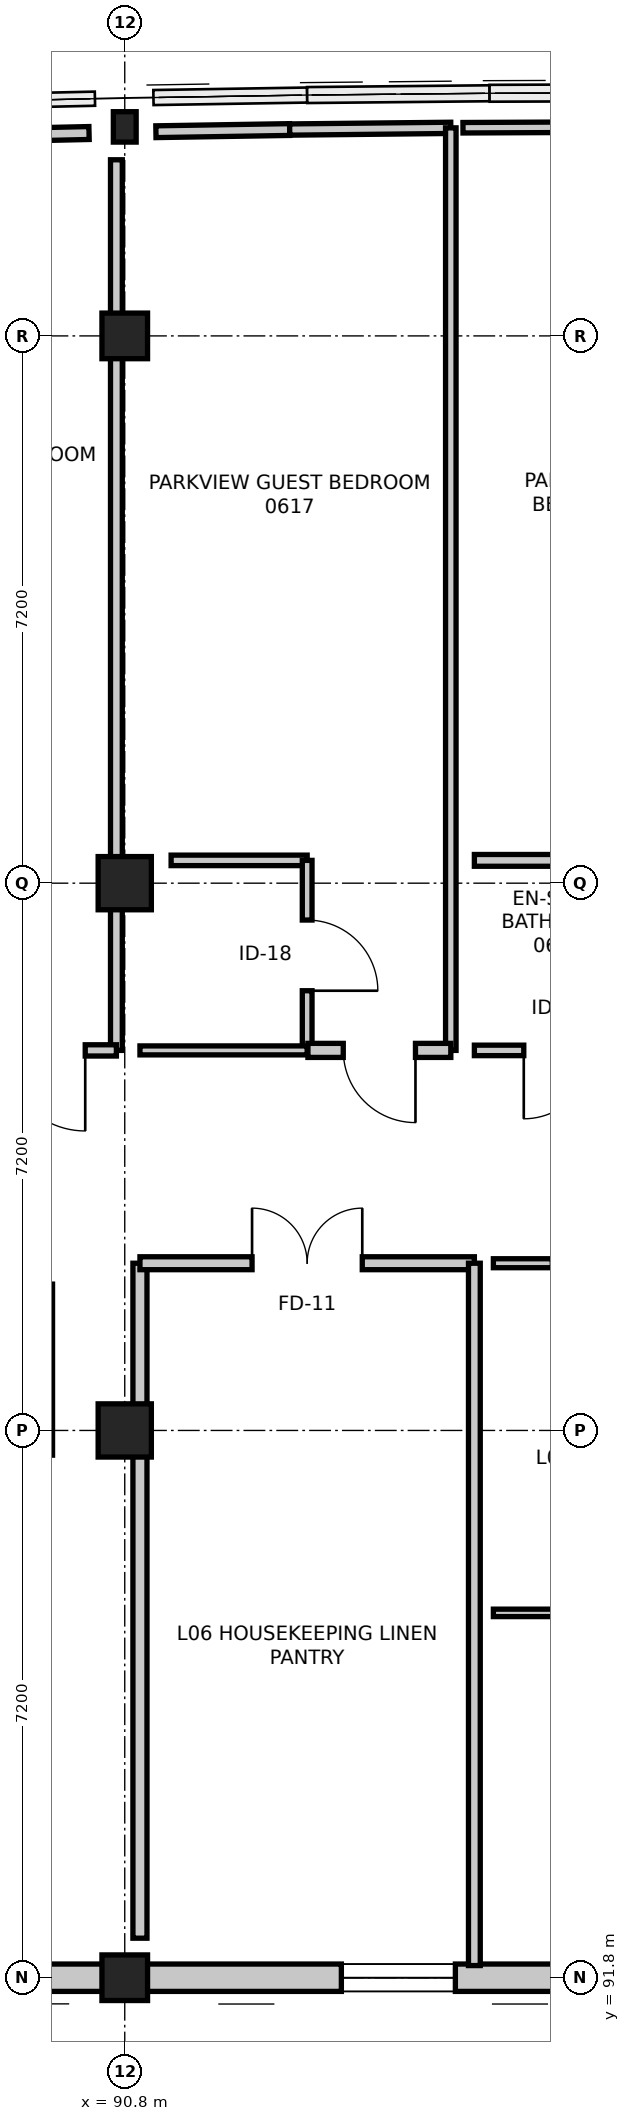
"""IFC4 building model, lengths in metres.
Left out: names, types, materials, properties, quantities, classifications, styles, units other than length and angle.
Written with IfcOpenShell. Run it as: python <this file> out.ifc"""

import sys

from ifc_helpers import new_model, si_unit, direction, frame, frame_2d, origin, origin_2d, place, context, subcontext, project, spatial, rectangle, i_section, extrude, element, fill, save


model = new_model("IFC4")
c1 = context("Model", 3, precision=1e-05, world=origin(), true_north=direction((0.0, 1.0)))
c2 = subcontext(c1, "Body", "Model", "MODEL_VIEW")
j1 = project(units=[si_unit("LENGTHUNIT", "METRE"), si_unit("PLANEANGLEUNIT", "RADIAN")], contexts=[c1])
p1 = place(None, origin())
s1 = spatial("IfcSite", under=j1, at=p1, CompositionType="ELEMENT")
p2 = place(p1, origin())
s2 = spatial("IfcBuilding", under=s1, at=p2, CompositionType="ELEMENT")
p3 = place(p2, frame((0.0, 0.0, 26.4)))
s3 = spatial("IfcBuildingStorey", under=s2, at=p3, CompositionType="ELEMENT", Elevation=26.4)
p4 = place(p3, frame((90.8, 91.8, 0.0), z_axis=(0.0, 0.0, 1.0), x_axis=(1.0, 0.0, 0.0)))
e1 = element("IfcColumn", 1, at=p4, inside=s3, PredefinedType="COLUMN", context=c2, shape_type="SweptSolid", body=[
    extrude(rectangle(XDim=0.6, YDim=0.6, at=origin_2d()), origin(), (0.0, 0.0, 1.0), 3.6),
])
for number, where, z_axis, x_axis in (
    (2, (90.8, 99.0, 0.0), (0.0, 0.0, 1.0), (1.0, 0.0, 0.0)),
    (3, (90.8, 106.2, 0.0), (0.0, 0.0, 1.0), (1.0, 0.0, 0.0)),
):
    element("IfcColumn", number, at=place(p3, frame(where, z_axis=z_axis, x_axis=x_axis)), inside=s3, PredefinedType="COLUMN", context=c2, shape_type="SweptSolid", body=[
        extrude(rectangle(XDim=0.7, YDim=0.7, at=origin_2d()), origin(), (0.0, 0.0, 1.0), 3.6),
    ])
p5 = place(p3, frame((90.8, 113.4, 0.0), z_axis=(0.0, 0.0, 1.0), x_axis=(1.0, 0.0, 0.0)))
e4 = element("IfcColumn", 4, at=p5, inside=s3, PredefinedType="COLUMN", context=c2, shape_type="SweptSolid", body=[
    extrude(rectangle(XDim=0.6, YDim=0.6, at=origin_2d()), origin(), (0.0, 0.0, 1.0), 3.6),
])
p6 = place(p3, frame((90.8, 116.15, 0.0), z_axis=(0.0, 0.0, 1.0), x_axis=(1.0, 0.0, 0.0)))
e5 = element("IfcColumn", 5, at=p6, inside=s3, PredefinedType="COLUMN", context=c2, shape_type="SweptSolid", body=[
    extrude(i_section(OverallWidth=0.3, OverallDepth=0.4, WebThickness=0.013, FlangeThickness=0.024, FilletRadius=0.027, at=origin_2d()), origin(), (0.0, 0.0, 1.0), 3.6),
])
p7 = place(p3, frame((98.0, 91.8, 0.0), z_axis=(0.0, 0.0, 1.0), x_axis=(-1.0, 0.0, 0.0)))
e6 = element("IfcWall", 6, at=p7, inside=s3, PredefinedType="STANDARD", context=c2, shape_type="SweptSolid", body=[
    extrude(rectangle(XDim=7.2, YDim=0.36, at=frame_2d((3.6, 0.0))), origin(), (0.0, 0.0, 1.0), 2.735),
])
p8 = place(p7, frame((2.85, 0.0, 0.75)))
e7 = element("IfcOpeningElement", 7, at=p8, cuts=e6, PredefinedType="OPENING", context=c2, shape_type="SweptSolid", body=[
    extrude(rectangle(XDim=1.5, YDim=1.5, at=frame_2d((0.75, 0.75))), frame((0.0, 0.19, 0.0), z_axis=(0.0, -1.0, 0.0), x_axis=(1.0, 0.0, 0.0)), (0.0, 0.0, 1.0), 0.38),
])
p9 = place(p3, frame((90.8, 91.8, 0.0), z_axis=(0.0, 0.0, 1.0), x_axis=(-1.0, 0.0, 0.0)))
e8 = element("IfcWall", 8, at=p9, inside=s3, PredefinedType="STANDARD", context=c2, shape_type="SweptSolid", body=[
    extrude(rectangle(XDim=7.2, YDim=0.36, at=frame_2d((3.6, 0.0))), origin(), (0.0, 0.0, 1.0), 2.735),
])
p10 = place(p9, frame((2.85, 0.0, 0.75)))
e9 = element("IfcOpeningElement", 9, at=p10, cuts=e8, PredefinedType="OPENING", context=c2, shape_type="SweptSolid", body=[
    extrude(rectangle(XDim=1.5, YDim=1.5, at=frame_2d((0.75, 0.75))), frame((0.0, 0.19, 0.0), z_axis=(0.0, -1.0, 0.0), x_axis=(1.0, 0.0, 0.0)), (0.0, 0.0, 1.0), 0.38),
])
p11 = place(p3, frame((91.0, 92.32, 0.0), z_axis=(0.0, 0.0, 1.0), x_axis=(0.0, 1.0, 0.0)))
e10 = element("IfcWall", 10, at=p11, inside=s3, PredefinedType="PARTITIONING", context=c2, shape_type="SweptSolid", body=[
    extrude(rectangle(XDim=8.88, YDim=0.185, at=frame_2d((4.44, 0.0))), origin(), (0.0, 0.0, 1.0), 2.685),
])
p12 = place(p3, frame((91.0, 101.2, 0.0), z_axis=(0.0, 0.0, 1.0), x_axis=(1.0, 0.0, 0.0)))
e11 = element("IfcWall", 11, at=p12, inside=s3, PredefinedType="PARTITIONING", context=c2, shape_type="SweptSolid", body=[
    extrude(rectangle(XDim=4.4, YDim=0.17, at=frame_2d((2.2, 0.0))), origin(), (0.0, 0.0, 1.0), 2.685),
])
p13 = place(p12, frame((1.475, 0.0, 0.0)))
e12 = element("IfcOpeningElement", 12, at=p13, cuts=e11, PredefinedType="OPENING", context=c2, shape_type="SweptSolid", body=[
    extrude(rectangle(XDim=1.45, YDim=2.2, at=frame_2d((0.725, 1.1))), frame((0.0, 0.095, 0.0), z_axis=(0.0, -1.0, 0.0), x_axis=(1.0, 0.0, 0.0)), (0.0, 0.0, 1.0), 0.19),
])
p14 = place(p3, frame((95.4, 101.2, 0.0), z_axis=(0.0, 0.0, 1.0), x_axis=(0.0, -1.0, 0.0)))
e13 = element("IfcWall", 13, at=p14, inside=s3, PredefinedType="PARTITIONING", context=c2, shape_type="SweptSolid", body=[
    extrude(rectangle(XDim=9.24, YDim=0.155, at=frame_2d((4.62, 0.0))), origin(), (0.0, 0.0, 1.0), 2.735),
])
p15 = place(p3, frame((95.65, 101.2, 0.0), z_axis=(0.0, 0.0, 1.0), x_axis=(1.0, 0.0, 0.0)))
e14 = element("IfcWall", 14, at=p15, inside=s3, PredefinedType="PARTITIONING", context=c2, shape_type="SweptSolid", body=[
    extrude(rectangle(XDim=3.25, YDim=0.118, at=frame_2d((1.625, 0.0))), origin(), (0.0, 0.0, 1.0), 2.685),
])
p16 = place(p15, frame((0.775, 0.0, 0.0)))
e15 = element("IfcOpeningElement", 15, at=p16, cuts=e14, PredefinedType="OPENING", context=c2, shape_type="SweptSolid", body=[
    extrude(rectangle(XDim=1.7, YDim=2.25, at=frame_2d((0.85, 1.125))), frame((0.0, 0.069, 0.0), z_axis=(0.0, -1.0, 0.0), x_axis=(1.0, 0.0, 0.0)), (0.0, 0.0, 1.0), 0.138),
])
p17 = place(p3, frame((98.9, 96.6, 0.0), z_axis=(0.0, 0.0, 1.0), x_axis=(-1.0, 0.0, 0.0)))
e16 = element("IfcWall", 16, at=p17, inside=s3, PredefinedType="PARTITIONING", context=c2, shape_type="SweptSolid", body=[
    extrude(rectangle(XDim=3.25, YDim=0.098, at=frame_2d((1.625, 0.0))), origin(), (0.0, 0.0, 1.0), 2.685),
])
p18 = place(p3, frame((88.57, 116.03, 0.0), z_axis=(0.0, 0.0, 1.0), x_axis=(0.999747602217, 0.022466238252, 0.0)))
e17 = element("IfcWall", 17, at=p18, inside=s3, PredefinedType="PARTITIONING", context=c2, shape_type="SweptSolid", body=[
    extrude(rectangle(XDim=1.76, YDim=0.17, at=frame_2d((0.88, 0.0))), origin(), (0.0, 0.0, 1.0), 2.926),
])
p19 = place(p3, frame((90.69, 115.717, 0.0), z_axis=(0.0, 0.0, 1.0), x_axis=(0.0, -1.0, 0.0)))
e18 = element("IfcWall", 18, at=p19, inside=s3, PredefinedType="PARTITIONING", context=c2, shape_type="SweptSolid", body=[
    extrude(rectangle(XDim=11.717, YDim=0.155, at=frame_2d((5.859, 0.0))), origin(), (0.0, 0.0, 1.0), 2.685),
])
p20 = place(p3, frame((90.69, 104.0, 0.0), z_axis=(0.0, 0.0, 1.0), x_axis=(-1.0, 0.0, 0.0)))
e19 = element("IfcWall", 19, at=p20, inside=s3, PredefinedType="PARTITIONING", context=c2, shape_type="SweptSolid", body=[
    extrude(rectangle(XDim=1.88, YDim=0.148, at=frame_2d((0.94, 0.0))), origin(), (0.0, 0.0, 1.0), 2.685),
])
p21 = place(p20, frame((0.41, 0.0, 0.0)))
e20 = element("IfcOpeningElement", 20, at=p21, cuts=e19, PredefinedType="OPENING", context=c2, shape_type="SweptSolid", body=[
    extrude(rectangle(XDim=1.06, YDim=2.2, at=frame_2d((0.53, 1.1))), frame((0.0, 0.084, 0.0), z_axis=(0.0, -1.0, 0.0), x_axis=(1.0, 0.0, 0.0)), (0.0, 0.0, 1.0), 0.168),
])
p22 = place(p3, frame((91.41, 106.5, 0.0), z_axis=(0.0, 0.0, 1.0), x_axis=(1.0, 0.0, 0.0)))
e21 = element("IfcWall", 21, at=p22, inside=s3, PredefinedType="PARTITIONING", context=c2, shape_type="SweptSolid", body=[
    extrude(rectangle(XDim=1.79, YDim=0.138, at=frame_2d((0.895, 0.0))), origin(), (0.0, 0.0, 1.0), 3.35),
])
p23 = place(p3, frame((93.2, 106.5, 0.0), z_axis=(0.0, 0.0, 1.0), x_axis=(0.0, -1.0, 0.0)))
e22 = element("IfcWall", 22, at=p23, inside=s3, PredefinedType="PARTITIONING", context=c2, shape_type="SweptSolid", body=[
    extrude(rectangle(XDim=2.5, YDim=0.128, at=frame_2d((1.25, 0.0))), origin(), (0.0, 0.0, 1.0), 2.735),
])
p24 = place(p23, frame((0.785, 0.0, 0.0)))
e23 = element("IfcOpeningElement", 23, at=p24, cuts=e22, PredefinedType="OPENING", context=c2, shape_type="SweptSolid", body=[
    extrude(rectangle(XDim=0.93, YDim=2.13, at=frame_2d((0.465, 1.065))), frame((0.0, 0.074, 0.0), z_axis=(0.0, -1.0, 0.0), x_axis=(1.0, 0.0, 0.0)), (0.0, 0.0, 1.0), 0.148),
])
p25 = place(p3, frame((93.2, 104.0, 0.0), z_axis=(0.0, 0.0, 1.0), x_axis=(-1.0, 0.0, 0.0)))
e24 = element("IfcWall", 24, at=p25, inside=s3, PredefinedType="PARTITIONING", context=c2, shape_type="SweptSolid", body=[
    extrude(rectangle(XDim=2.2, YDim=0.118, at=frame_2d((1.1, 0.0))), origin(), (0.0, 0.0, 1.0), 2.685),
])
p26 = place(p3, frame((91.21, 116.086, 0.0), z_axis=(0.0, 0.0, 1.0), x_axis=(0.999868324223, 0.016227575799, 0.0)))
e25 = element("IfcWall", 25, at=p26, inside=s3, PredefinedType="PARTITIONING", context=c2, shape_type="SweptSolid", body=[
    extrude(rectangle(XDim=1.76, YDim=0.155, at=frame_2d((0.88, 0.0))), origin(), (0.0, 0.0, 1.0), 2.926),
])
p27 = place(p3, frame((92.97, 116.115, 0.0), z_axis=(0.0, 0.0, 1.0), x_axis=(0.999945099362, 0.01047846661, 0.0)))
e26 = element("IfcWall", 26, at=p27, inside=s3, PredefinedType="PARTITIONING", context=c2, shape_type="SweptSolid", body=[
    extrude(rectangle(XDim=2.12, YDim=0.148, at=frame_2d((1.06, 0.0))), origin(), (0.0, 0.0, 1.0), 2.926),
])
p28 = place(p3, frame((95.09, 116.137, 0.0), z_axis=(0.0, 0.0, 1.0), x_axis=(0.0, -1.0, 0.0)))
e27 = element("IfcWall", 27, at=p28, inside=s3, PredefinedType="PARTITIONING", context=c2, shape_type="SweptSolid", body=[
    extrude(rectangle(XDim=12.137, YDim=0.138, at=frame_2d((6.069, 0.0))), origin(), (0.0, 0.0, 1.0), 2.735),
])
p29 = place(p3, frame((95.09, 104.0, 0.0), z_axis=(0.0, 0.0, 1.0), x_axis=(-1.0, 0.0, 0.0)))
e28 = element("IfcWall", 28, at=p29, inside=s3, PredefinedType="PARTITIONING", context=c2, shape_type="SweptSolid", body=[
    extrude(rectangle(XDim=1.88, YDim=0.185, at=frame_2d((0.94, 0.0))), origin(), (0.0, 0.0, 1.0), 3.35),
])
p30 = place(p29, frame((0.465, 0.0, 0.0)))
e29 = element("IfcOpeningElement", 29, at=p30, cuts=e28, PredefinedType="OPENING", context=c2, shape_type="SweptSolid", body=[
    extrude(rectangle(XDim=0.95, YDim=2.1, at=frame_2d((0.475, 1.05))), frame((0.0, 0.103, 0.0), z_axis=(0.0, -1.0, 0.0), x_axis=(1.0, 0.0, 0.0)), (0.0, 0.0, 1.0), 0.205),
])
p31 = place(p3, frame((95.4, 106.5, 0.0), z_axis=(0.0, 0.0, 1.0), x_axis=(1.0, 0.0, 0.0)))
e30 = element("IfcWall", 30, at=p31, inside=s3, PredefinedType="PARTITIONING", context=c2, shape_type="SweptSolid", body=[
    extrude(rectangle(XDim=2.2, YDim=0.155, at=frame_2d((1.1, 0.0))), origin(), (0.0, 0.0, 1.0), 3.35),
])
p32 = place(p3, frame((97.6, 104.0, 0.0), z_axis=(0.0, 0.0, 1.0), x_axis=(-1.0, 0.0, 0.0)))
e31 = element("IfcWall", 31, at=p32, inside=s3, PredefinedType="PARTITIONING", context=c2, shape_type="SweptSolid", body=[
    extrude(rectangle(XDim=2.2, YDim=0.138, at=frame_2d((1.1, 0.0))), origin(), (0.0, 0.0, 1.0), 3.35),
])
p33 = place(p32, frame((0.65, 0.0, 0.0)))
e32 = element("IfcOpeningElement", 32, at=p33, cuts=e31, PredefinedType="OPENING", context=c2, shape_type="SweptSolid", body=[
    extrude(rectangle(XDim=0.9, YDim=2.08, at=frame_2d((0.45, 1.04))), frame((0.0, 0.079, 0.0), z_axis=(0.0, -1.0, 0.0), x_axis=(1.0, 0.0, 0.0)), (0.0, 0.0, 1.0), 0.158),
])
p34 = place(p3, frame((95.25, 116.139, 0.0), z_axis=(0.0, 0.0, 1.0), x_axis=(0.999990426046, 0.004375821763, 0.0)))
e33 = element("IfcWall", 33, at=p34, inside=s3, PredefinedType="PARTITIONING", context=c2, shape_type="SweptSolid", body=[
    extrude(rectangle(XDim=2.12, YDim=0.138, at=frame_2d((1.06, 0.0))), origin(), (0.0, 0.0, 1.0), 2.926),
])
p35 = place(p8, origin())
e34 = element("IfcWindow", 34, at=p35, inside=s3, PartitioningType="SINGLE_PANEL", PredefinedType="WINDOW", context=c2, shape_type="SweptSolid", body=[
    extrude(rectangle(XDim=1.5, YDim=1.5, at=frame_2d((0.75, 0.75))), frame((0.0, 0.03, 0.0), z_axis=(0.0, -1.0, 0.0), x_axis=(1.0, 0.0, 0.0)), (0.0, 0.0, 1.0), 0.06),
])
fill(e7, e34)
p36 = place(p13, origin())
e35 = element("IfcDoor", 35, at=p36, inside=s3, OperationType="DOUBLE_DOOR_SINGLE_SWING", PredefinedType="DOOR", context=c2, shape_type="SweptSolid", body=[
    extrude(rectangle(XDim=1.45, YDim=2.2, at=frame_2d((0.725, 1.1))), frame((0.0, 0.025, 0.0), z_axis=(0.0, -1.0, 0.0), x_axis=(1.0, 0.0, 0.0)), (0.0, 0.0, 1.0), 0.05),
])
fill(e12, e35)
p37 = place(p21, origin())
e36 = element("IfcDoor", 36, at=p37, inside=s3, OperationType="SINGLE_SWING_LEFT", PredefinedType="DOOR", context=c2, shape_type="SweptSolid", body=[
    extrude(rectangle(XDim=1.06, YDim=2.2, at=frame_2d((0.53, 1.1))), frame((0.0, 0.025, 0.0), z_axis=(0.0, -1.0, 0.0), x_axis=(1.0, 0.0, 0.0)), (0.0, 0.0, 1.0), 0.05),
])
fill(e20, e36)
p38 = place(p24, origin())
e37 = element("IfcDoor", 37, at=p38, inside=s3, OperationType="SINGLE_SWING_RIGHT", PredefinedType="DOOR", context=c2, shape_type="SweptSolid", body=[
    extrude(rectangle(XDim=0.93, YDim=2.13, at=frame_2d((0.465, 1.065))), frame((0.0, 0.025, 0.0), z_axis=(0.0, -1.0, 0.0), x_axis=(1.0, 0.0, 0.0)), (0.0, 0.0, 1.0), 0.05),
])
fill(e23, e37)
p39 = place(p30, origin())
e38 = element("IfcDoor", 38, at=p39, inside=s3, OperationType="SINGLE_SWING_LEFT", PredefinedType="DOOR", context=c2, shape_type="SweptSolid", body=[
    extrude(rectangle(XDim=0.95, YDim=2.1, at=frame_2d((0.475, 1.05))), frame((0.0, 0.025, 0.0), z_axis=(0.0, -1.0, 0.0), x_axis=(1.0, 0.0, 0.0)), (0.0, 0.0, 1.0), 0.05),
])
fill(e29, e38)
p40 = place(p33, origin())
e39 = element("IfcDoor", 39, at=p40, inside=s3, OperationType="SINGLE_SWING_RIGHT", PredefinedType="DOOR", context=c2, shape_type="SweptSolid", body=[
    extrude(rectangle(XDim=0.9, YDim=2.08, at=frame_2d((0.45, 1.04))), frame((0.0, 0.025, 0.0), z_axis=(0.0, -1.0, 0.0), x_axis=(1.0, 0.0, 0.0)), (0.0, 0.0, 1.0), 0.05),
])
fill(e32, e39)
save(model, sys.argv[1])
